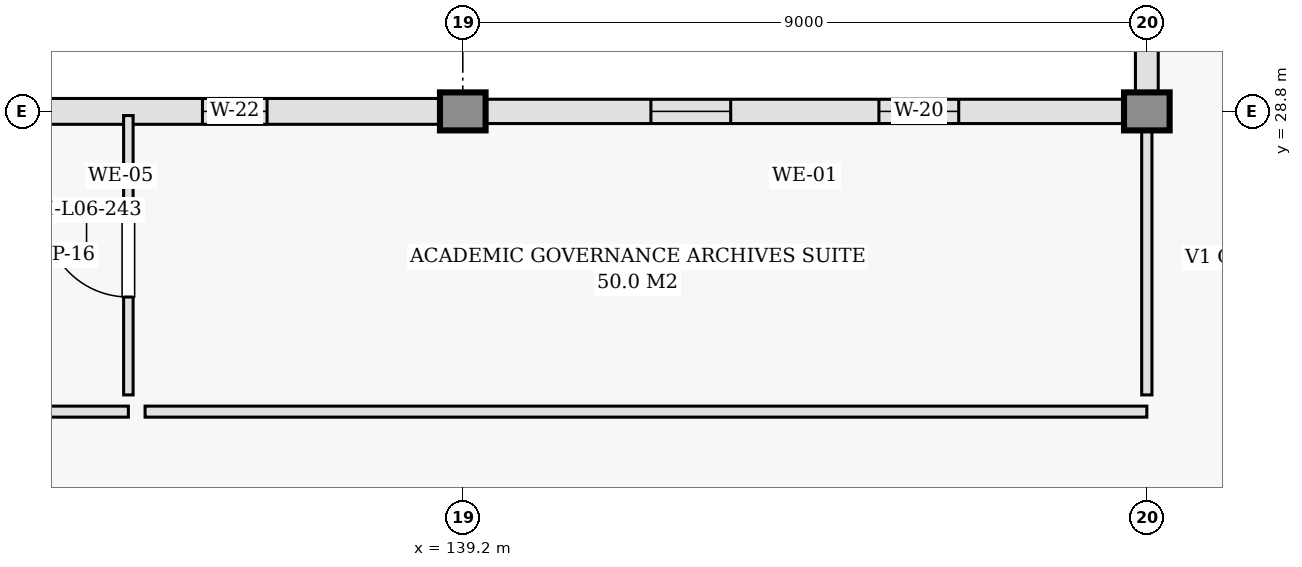
"""IFC4 building model, lengths in metres.
Left out: names, types, materials, properties, quantities, classifications, styles, units other than length and angle.
Written with IfcOpenShell. Run it as: python <this file> out.ifc"""

import sys

from ifc_helpers import new_model, si_unit, direction, frame, frame_2d, origin, origin_2d, place, context, subcontext, project, spatial, rectangle, extrude, element, fill, save


model = new_model("IFC4")
c1 = context("Model", 3, precision=1e-05, world=origin(), true_north=direction((0.0, 1.0)))
c2 = subcontext(c1, "Body", "Model", "MODEL_VIEW")
j1 = project(units=[si_unit("LENGTHUNIT", "METRE"), si_unit("PLANEANGLEUNIT", "RADIAN")], contexts=[c1])
p1 = place(None, origin())
s1 = spatial("IfcSite", under=j1, at=p1, CompositionType="ELEMENT")
p2 = place(p1, origin())
s2 = spatial("IfcBuilding", under=s1, at=p2, CompositionType="ELEMENT")
p3 = place(p2, frame((0.0, 0.0, 26.4)))
s3 = spatial("IfcBuildingStorey", under=s2, at=p3, CompositionType="ELEMENT", Elevation=26.4)
for number, where, z_axis, x_axis in (
    (1, (139.2, 28.8, 0.0), (0.0, 0.0, 1.0), (1.0, 0.0, 0.0)),
    (2, (148.2, 28.8, 0.0), (0.0, 0.0, 1.0), (1.0, 0.0, 0.0)),
):
    element("IfcColumn", number, at=place(p3, frame(where, z_axis=z_axis, x_axis=x_axis)), inside=s3, PredefinedType="COLUMN", context=c2, shape_type="SweptSolid", body=[
        extrude(rectangle(XDim=0.5, YDim=0.5, at=origin_2d()), origin(), (0.0, 0.0, 1.0), 3.45),
    ])
p4 = place(p3, frame((148.2, 36.0, 0.0), z_axis=(0.0, 0.0, 1.0), x_axis=(0.0, -1.0, 0.0)))
e3 = element("IfcWall", 3, at=p4, inside=s3, PredefinedType="SOLIDWALL", context=c2, shape_type="SweptSolid", body=[
    extrude(rectangle(XDim=7.2, YDim=0.3, at=frame_2d((3.6, 0.0))), origin(), (0.0, 0.0, 1.0), 2.405),
])
p5 = place(p4, frame((2.4, 0.0, 1.185)))
e4 = element("IfcOpeningElement", 4, at=p5, cuts=e3, PredefinedType="OPENING", context=c2, shape_type="SweptSolid", body=[
    extrude(rectangle(XDim=2.4, YDim=1.0, at=frame_2d((1.2, 0.5))), frame((0.0, 0.16, 0.0), z_axis=(0.0, -1.0, 0.0), x_axis=(1.0, 0.0, 0.0)), (0.0, 0.0, 1.0), 0.32),
])
p6 = place(p3, frame((148.2, 28.8, 0.0), z_axis=(0.0, 0.0, 1.0), x_axis=(-1.0, 0.0, 0.0)))
e5 = element("IfcWall", 5, at=p6, inside=s3, PredefinedType="SOLIDWALL", context=c2, shape_type="SweptSolid", body=[
    extrude(rectangle(XDim=9.0, YDim=0.32, at=frame_2d((4.5, 0.0))), origin(), (0.0, 0.0, 1.0), 2.555),
])
p7 = place(p6, frame((2.475, 0.0, 0.9)))
e6 = element("IfcOpeningElement", 6, at=p7, cuts=e5, PredefinedType="OPENING", context=c2, shape_type="SweptSolid", body=[
    extrude(rectangle(XDim=1.05, YDim=1.4, at=frame_2d((0.525, 0.7))), frame((0.0, 0.17, 0.0), z_axis=(0.0, -1.0, 0.0), x_axis=(1.0, 0.0, 0.0)), (0.0, 0.0, 1.0), 0.34),
])
p8 = place(p6, frame((5.475, 0.0, 0.9)))
e7 = element("IfcOpeningElement", 7, at=p8, cuts=e5, PredefinedType="OPENING", context=c2, shape_type="SweptSolid", body=[
    extrude(rectangle(XDim=1.05, YDim=1.4, at=frame_2d((0.525, 0.7))), frame((0.0, 0.17, 0.0), z_axis=(0.0, -1.0, 0.0), x_axis=(1.0, 0.0, 0.0)), (0.0, 0.0, 1.0), 0.34),
])
p9 = place(p3, frame((139.2, 28.8, 0.0), z_axis=(0.0, 0.0, 1.0), x_axis=(-1.0, 0.0, 0.0)))
e8 = element("IfcWall", 8, at=p9, inside=s3, PredefinedType="SOLIDWALL", context=c2, shape_type="SweptSolid", body=[
    extrude(rectangle(XDim=9.0, YDim=0.34, at=frame_2d((4.5, 0.0))), origin(), (0.0, 0.0, 1.0), 2.555),
])
p10 = place(p9, frame((2.575, 0.0, 0.9)))
e9 = element("IfcOpeningElement", 9, at=p10, cuts=e8, PredefinedType="OPENING", context=c2, shape_type="SweptSolid", body=[
    extrude(rectangle(XDim=0.85, YDim=1.3, at=frame_2d((0.425, 0.65))), frame((0.0, 0.18, 0.0), z_axis=(0.0, -1.0, 0.0), x_axis=(1.0, 0.0, 0.0)), (0.0, 0.0, 1.0), 0.36),
])
p11 = place(p9, frame((5.575, 0.0, 0.9)))
e10 = element("IfcOpeningElement", 10, at=p11, cuts=e8, PredefinedType="OPENING", context=c2, shape_type="SweptSolid", body=[
    extrude(rectangle(XDim=0.85, YDim=1.3, at=frame_2d((0.425, 0.65))), frame((0.0, 0.18, 0.0), z_axis=(0.0, -1.0, 0.0), x_axis=(1.0, 0.0, 0.0)), (0.0, 0.0, 1.0), 0.36),
])
p12 = place(p3, frame((121.6, 24.85, 0.0), z_axis=(0.0, 0.0, 1.0), x_axis=(1.0, 0.0, 0.0)))
e11 = element("IfcWall", 11, at=p12, inside=s3, PredefinedType="PARTITIONING", context=c2, shape_type="SweptSolid", body=[
    extrude(rectangle(XDim=13.2, YDim=0.145, at=frame_2d((6.6, 0.0))), origin(), (0.0, 0.0, 1.0), 2.555),
])
p13 = place(p12, frame((6.05, 0.0, 0.0)))
e12 = element("IfcOpeningElement", 12, at=p13, cuts=e11, PredefinedType="OPENING", context=c2, shape_type="SweptSolid", body=[
    extrude(rectangle(XDim=1.1, YDim=2.15, at=frame_2d((0.55, 1.075))), frame((0.0, 0.083, 0.0), z_axis=(0.0, -1.0, 0.0), x_axis=(1.0, 0.0, 0.0)), (0.0, 0.0, 1.0), 0.165),
])
p14 = place(p3, frame((134.8, 25.07, 0.0), z_axis=(0.0, 0.0, 1.0), x_axis=(0.0, 1.0, 0.0)))
e13 = element("IfcWall", 13, at=p14, inside=s3, PredefinedType="PARTITIONING", context=c2, shape_type="SweptSolid", body=[
    extrude(rectangle(XDim=3.675, YDim=0.125, at=frame_2d((1.837, 0.0))), origin(), (0.0, 0.0, 1.0), 3.22),
])
p15 = place(p14, frame((1.288, 0.0, 0.0)))
e14 = element("IfcOpeningElement", 14, at=p15, cuts=e13, PredefinedType="OPENING", context=c2, shape_type="SweptSolid", body=[
    extrude(rectangle(XDim=1.1, YDim=2.15, at=frame_2d((0.55, 1.075))), frame((0.0, 0.073, 0.0), z_axis=(0.0, -1.0, 0.0), x_axis=(1.0, 0.0, 0.0)), (0.0, 0.0, 1.0), 0.145),
])
p16 = place(p3, frame((135.02, 24.85, 0.0), z_axis=(0.0, 0.0, 1.0), x_axis=(1.0, 0.0, 0.0)))
e15 = element("IfcWall", 15, at=p16, inside=s3, PredefinedType="PARTITIONING", context=c2, shape_type="SweptSolid", body=[
    extrude(rectangle(XDim=13.18, YDim=0.145, at=frame_2d((6.59, 0.0))), origin(), (0.0, 0.0, 1.0), 2.555),
])
p17 = place(p3, frame((148.2, 25.07, 0.0), z_axis=(0.0, 0.0, 1.0), x_axis=(0.0, 1.0, 0.0)))
e16 = element("IfcWall", 16, at=p17, inside=s3, PredefinedType="PARTITIONING", context=c2, shape_type="SweptSolid", body=[
    extrude(rectangle(XDim=3.49, YDim=0.135, at=frame_2d((1.745, 0.0))), origin(), (0.0, 0.0, 1.0), 3.22),
])
p18 = place(p7, origin())
e17 = element("IfcWindow", 17, at=p18, inside=s3, PartitioningType="DOUBLE_PANEL_VERTICAL", PredefinedType="WINDOW", context=c2, shape_type="SweptSolid", body=[
    extrude(rectangle(XDim=1.05, YDim=1.4, at=frame_2d((0.525, 0.7))), frame((0.0, 0.03, 0.0), z_axis=(0.0, -1.0, 0.0), x_axis=(1.0, 0.0, 0.0)), (0.0, 0.0, 1.0), 0.06),
])
fill(e6, e17)
p19 = place(p8, origin())
e18 = element("IfcWindow", 18, at=p19, inside=s3, PartitioningType="DOUBLE_PANEL_VERTICAL", PredefinedType="WINDOW", context=c2, shape_type="SweptSolid", body=[
    extrude(rectangle(XDim=1.05, YDim=1.4, at=frame_2d((0.525, 0.7))), frame((0.0, 0.03, 0.0), z_axis=(0.0, -1.0, 0.0), x_axis=(1.0, 0.0, 0.0)), (0.0, 0.0, 1.0), 0.06),
])
fill(e7, e18)
p20 = place(p10, origin())
e19 = element("IfcWindow", 19, at=p20, inside=s3, PartitioningType="DOUBLE_PANEL_VERTICAL", PredefinedType="WINDOW", context=c2, shape_type="SweptSolid", body=[
    extrude(rectangle(XDim=0.85, YDim=1.3, at=frame_2d((0.425, 0.65))), frame((0.0, 0.03, 0.0), z_axis=(0.0, -1.0, 0.0), x_axis=(1.0, 0.0, 0.0)), (0.0, 0.0, 1.0), 0.06),
])
fill(e9, e19)
p21 = place(p15, origin())
e20 = element("IfcDoor", 20, at=p21, inside=s3, OperationType="SINGLE_SWING_RIGHT", PredefinedType="DOOR", context=c2, shape_type="SweptSolid", body=[
    extrude(rectangle(XDim=1.1, YDim=2.15, at=frame_2d((0.55, 1.075))), frame((0.0, 0.025, 0.0), z_axis=(0.0, -1.0, 0.0), x_axis=(1.0, 0.0, 0.0)), (0.0, 0.0, 1.0), 0.05),
])
fill(e14, e20)
save(model, sys.argv[1])
